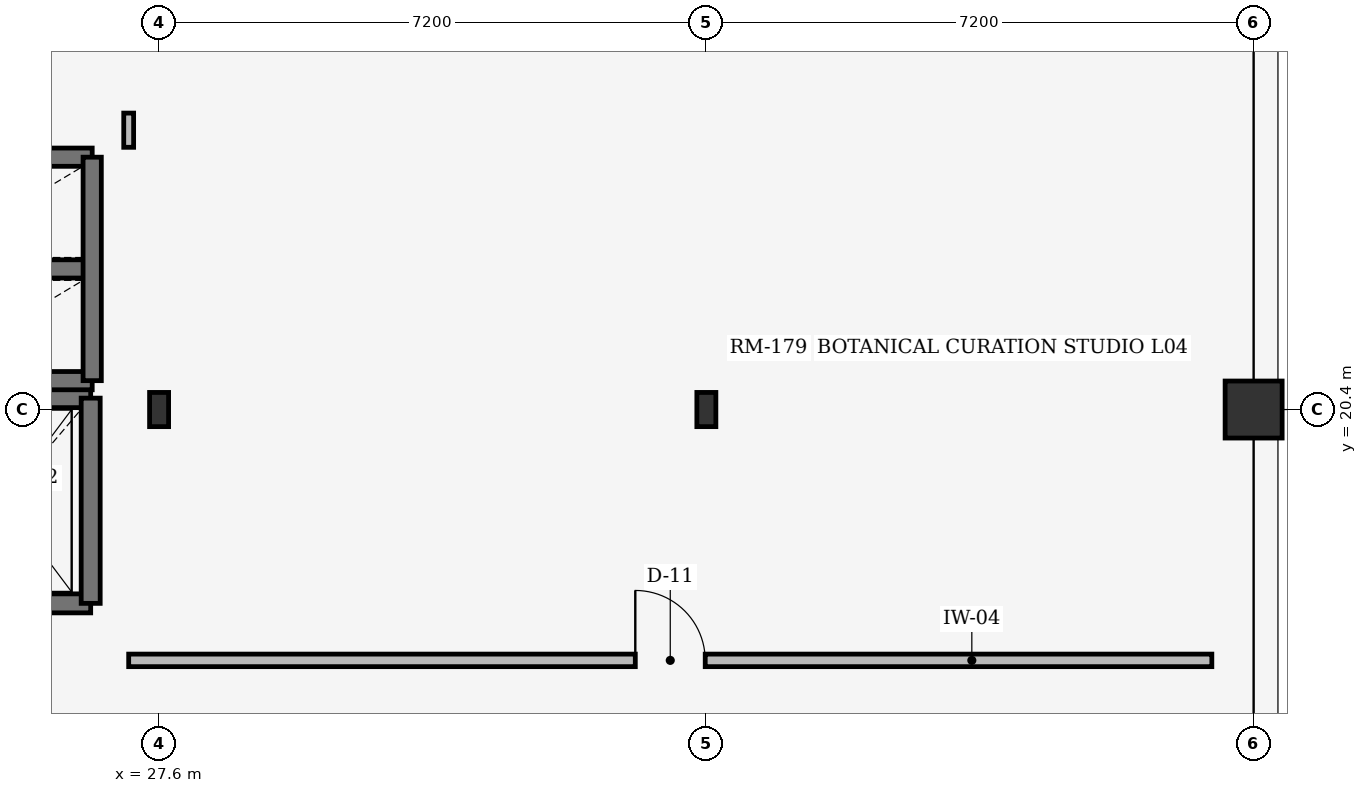
"""IFC4 building model, lengths in metres.
Left out: names, types, materials, properties, quantities, classifications, styles, units other than length and angle.
Written with IfcOpenShell. Run it as: python <this file> out.ifc"""

import sys

from ifc_helpers import new_model, si_unit, direction, frame, frame_2d, origin, origin_2d, place, context, subcontext, project, spatial, rectangle, i_section, extrude, element, fill, save


model = new_model("IFC4")
c1 = context("Model", 3, precision=1e-05, world=origin(), true_north=direction((0.0, 1.0)))
c2 = subcontext(c1, "Body", "Model", "MODEL_VIEW")
j1 = project(units=[si_unit("LENGTHUNIT", "METRE"), si_unit("PLANEANGLEUNIT", "RADIAN")], contexts=[c1])
p1 = place(None, origin())
s1 = spatial("IfcSite", under=j1, at=p1, CompositionType="ELEMENT")
p2 = place(p1, origin())
s2 = spatial("IfcBuilding", under=s1, at=p2, CompositionType="ELEMENT")
p3 = place(p2, frame((0.0, 0.0, 17.1)))
s3 = spatial("IfcBuildingStorey", under=s2, at=p3, CompositionType="ELEMENT", Elevation=17.1)
for number, where, z_axis, x_axis in (
    (1, (27.6, 20.4, 0.0), (0.0, 0.0, 1.0), (1.0, 0.0, 0.0)),
    (2, (34.8, 20.4, 0.0), (0.0, 0.0, 1.0), (1.0, 0.0, 0.0)),
):
    element("IfcColumn", number, at=place(p3, frame(where, z_axis=z_axis, x_axis=x_axis)), inside=s3, PredefinedType="COLUMN", context=c2, shape_type="SweptSolid", body=[
        extrude(i_section(OverallWidth=0.25, OverallDepth=0.45, WebThickness=0.011, FlangeThickness=0.014, at=origin_2d()), origin(), (0.0, 0.0, 1.0), 3.66),
    ])
p4 = place(p3, frame((42.0, 20.4, 0.0), z_axis=(0.0, 0.0, 1.0), x_axis=(1.0, 0.0, 0.0)))
e3 = element("IfcColumn", 3, at=p4, inside=s3, PredefinedType="COLUMN", context=c2, shape_type="SweptSolid", body=[
    extrude(rectangle(XDim=0.75, YDim=0.75, at=origin_2d()), origin(), (0.0, 0.0, 1.0), 3.66),
])
p5 = place(p3, frame((24.4, 17.85, 0.0), z_axis=(0.0, 0.0, 1.0), x_axis=(1.0, 0.0, 0.0)))
e4 = element("IfcWall", 4, at=p5, inside=s3, PredefinedType="SHEAR", context=c2, shape_type="SweptSolid", body=[
    extrude(rectangle(XDim=2.3, YDim=0.25, at=frame_2d((1.15, 0.0))), origin(), (0.0, 0.0, 1.0), 3.66),
])
p6 = place(p5, frame((0.6, 0.0, 0.0)))
e5 = element("IfcOpeningElement", 5, at=p6, cuts=e4, PredefinedType="OPENING", context=c2, shape_type="SweptSolid", body=[
    extrude(rectangle(XDim=1.1, YDim=2.2, at=frame_2d((0.55, 1.1))), frame((0.0, 0.135, 0.0), z_axis=(0.0, -1.0, 0.0), x_axis=(1.0, 0.0, 0.0)), (0.0, 0.0, 1.0), 0.27),
])
p7 = place(p3, frame((24.4, 20.55, 0.0), z_axis=(0.0, 0.0, 1.0), x_axis=(1.0, 0.0, 0.0)))
e6 = element("IfcWall", 6, at=p7, inside=s3, PredefinedType="SHEAR", context=c2, shape_type="SweptSolid", body=[
    extrude(rectangle(XDim=2.3, YDim=0.25, at=frame_2d((1.15, 0.0))), origin(), (0.0, 0.0, 1.0), 3.66),
])
p8 = place(p3, frame((26.7, 17.85, 0.0), z_axis=(0.0, 0.0, 1.0), x_axis=(0.0, 1.0, 0.0)))
e7 = element("IfcWall", 7, at=p8, inside=s3, PredefinedType="SHEAR", context=c2, shape_type="SweptSolid", body=[
    extrude(rectangle(XDim=2.7, YDim=0.25, at=frame_2d((1.35, 0.0))), origin(), (0.0, 0.0, 1.0), 3.66),
])
for number, where, z_axis, x_axis in (
    (8, (24.48, 20.78, 0.0), (0.0, 0.0, 1.0), (1.0, 0.0, 0.0)),
    (9, (24.48, 22.25, 0.0), (0.0, 0.0, 1.0), (1.0, 0.0, 0.0)),
    (10, (24.48, 23.72, 0.0), (0.0, 0.0, 1.0), (1.0, 0.0, 0.0)),
):
    element("IfcWall", number, at=place(p3, frame(where, z_axis=z_axis, x_axis=x_axis)), inside=s3, PredefinedType="SHEAR", context=c2, shape_type="SweptSolid", body=[
        extrude(rectangle(XDim=2.24, YDim=0.24, at=frame_2d((1.12, 0.0))), origin(), (0.0, 0.0, 1.0), 3.66),
    ])
p9 = place(p3, frame((26.72, 20.78, 0.0), z_axis=(0.0, 0.0, 1.0), x_axis=(0.0, 1.0, 0.0)))
e11 = element("IfcWall", 11, at=p9, inside=s3, PredefinedType="SHEAR", context=c2, shape_type="SweptSolid", body=[
    extrude(rectangle(XDim=2.94, YDim=0.24, at=frame_2d((1.47, 0.0))), origin(), (0.0, 0.0, 1.0), 3.66),
])
p10 = place(p3, frame((27.2, 17.1, 0.0), z_axis=(0.0, 0.0, 1.0), x_axis=(1.0, 0.0, 0.0)))
e12 = element("IfcWall", 12, at=p10, inside=s3, PredefinedType="PARTITIONING", context=c2, shape_type="SweptSolid", body=[
    extrude(rectangle(XDim=14.25, YDim=0.165, at=frame_2d((7.125, 0.0))), origin(), (0.0, 0.0, 1.0), 3.64),
])
p11 = place(p10, frame((6.665, 0.0, 0.0)))
e13 = element("IfcOpeningElement", 13, at=p11, cuts=e12, PredefinedType="OPENING", context=c2, shape_type="SweptSolid", body=[
    extrude(rectangle(XDim=0.92, YDim=2.1, at=frame_2d((0.46, 1.05))), frame((0.0, 0.093, 0.0), z_axis=(0.0, -1.0, 0.0), x_axis=(1.0, 0.0, 0.0)), (0.0, 0.0, 1.0), 0.185),
])
p12 = place(p3, frame((27.2, 24.3, 0.0), z_axis=(0.0, 0.0, 1.0), x_axis=(0.0, -1.0, 0.0)))
e14 = element("IfcWall", 14, at=p12, inside=s3, PredefinedType="PARTITIONING", context=c2, shape_type="SweptSolid", body=[
    extrude(rectangle(XDim=0.45, YDim=0.13, at=frame_2d((0.225, 0.0))), origin(), (0.0, 0.0, 1.0), 3.64),
])
p13 = place(p11, origin())
e15 = element("IfcDoor", 15, at=p13, inside=s3, OperationType="SINGLE_SWING_LEFT", PredefinedType="DOOR", context=c2, shape_type="SweptSolid", body=[
    extrude(rectangle(XDim=0.92, YDim=2.1, at=frame_2d((0.46, 1.05))), frame((0.0, 0.025, 0.0), z_axis=(0.0, -1.0, 0.0), x_axis=(1.0, 0.0, 0.0)), (0.0, 0.0, 1.0), 0.05),
])
fill(e13, e15)
save(model, sys.argv[1])
